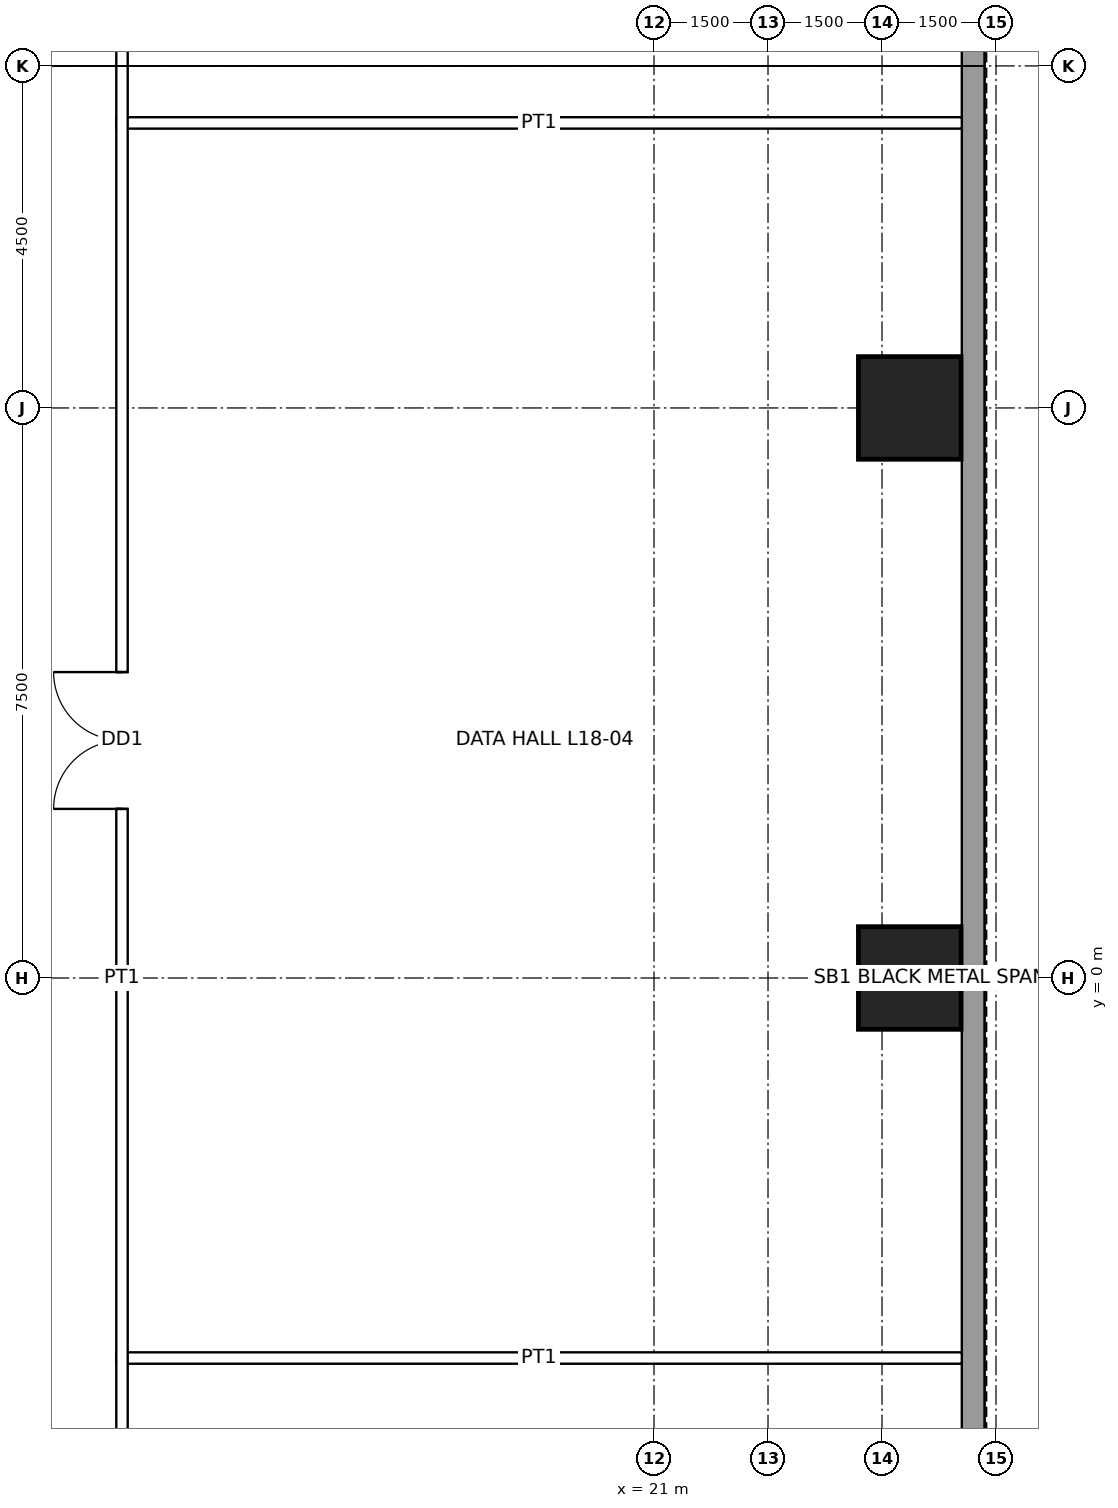
"""IFC4 building model, lengths in metres.
Left out: names, types, materials, properties, quantities, classifications, styles, units other than length and angle.
Written with IfcOpenShell. Run it as: python <this file> out.ifc"""

import sys

from ifc_helpers import new_model, si_unit, direction, frame, frame_2d, origin, origin_2d, place, context, subcontext, project, spatial, rectangle, hollow_rectangle, extrude, element, fill, save


model = new_model("IFC4")
c1 = context("Model", 3, precision=1e-05, world=origin(), true_north=direction((0.0, 1.0)))
c2 = subcontext(c1, "Body", "Model", "MODEL_VIEW")
j1 = project(units=[si_unit("LENGTHUNIT", "METRE"), si_unit("PLANEANGLEUNIT", "RADIAN")], contexts=[c1])
p1 = place(None, origin())
s1 = spatial("IfcSite", under=j1, at=p1, CompositionType="ELEMENT")
p2 = place(p1, origin())
s2 = spatial("IfcBuilding", under=s1, at=p2, CompositionType="ELEMENT")
p3 = place(p2, frame((0.0, 0.0, 93.4)))
s3 = spatial("IfcBuildingStorey", under=s2, at=p3, CompositionType="ELEMENT", Elevation=93.4)
for number, where, z_axis, x_axis in (
    (1, (24.365, 7.5, 0.0), (0.0, 0.0, 1.0), (1.0, 0.0, 0.0)),
    (2, (24.365, 0.0, 0.0), (0.0, 0.0, 1.0), (1.0, 0.0, 0.0)),
):
    element("IfcColumn", number, at=place(p3, frame(where, z_axis=z_axis, x_axis=x_axis)), inside=s3, PredefinedType="COLUMN", context=c2, shape_type="SweptSolid", body=[
        extrude(hollow_rectangle(XDim=1.35, YDim=1.35, WallThickness=0.1, at=origin_2d()), origin(), (0.0, 0.0, 1.0), 5.0),
    ])
p4 = place(p3, frame((25.2, 17.7, 0.0), z_axis=(0.0, 0.0, 1.0), x_axis=(0.0, -1.0, 0.0)))
e3 = element("IfcWall", 3, at=p4, inside=s3, PredefinedType="SOLIDWALL", context=c2, shape_type="SweptSolid", body=[
    extrude(rectangle(XDim=35.4, YDim=0.3, at=frame_2d((17.7, 0.0))), origin(), (0.0, 0.0, 1.0), 4.75),
])
p5 = place(p3, frame((13.925, -5.0, 0.0), z_axis=(0.0, 0.0, 1.0), x_axis=(1.0, 0.0, 0.0)))
e4 = element("IfcWall", 4, at=p5, inside=s3, PredefinedType="PARTITIONING", context=c2, shape_type="SweptSolid", body=[
    extrude(rectangle(XDim=11.125, YDim=0.15, at=frame_2d((5.562, 0.0))), origin(), (0.0, 0.0, 1.0), 4.75),
])
p6 = place(p3, frame((13.925, 11.25, 0.0), z_axis=(0.0, 0.0, 1.0), x_axis=(1.0, 0.0, 0.0)))
e5 = element("IfcWall", 5, at=p6, inside=s3, PredefinedType="PARTITIONING", context=c2, shape_type="SweptSolid", body=[
    extrude(rectangle(XDim=11.125, YDim=0.15, at=frame_2d((5.562, 0.0))), origin(), (0.0, 0.0, 1.0), 3.823),
])
p7 = place(p3, frame((14.0, -14.075, 0.0), z_axis=(0.0, 0.0, 1.0), x_axis=(0.0, 1.0, 0.0)))
e6 = element("IfcWall", 6, at=p7, inside=s3, PredefinedType="PARTITIONING", context=c2, shape_type="SweptSolid", body=[
    extrude(rectangle(XDim=28.15, YDim=0.15, at=frame_2d((14.075, 0.0))), origin(), (0.0, 0.0, 1.0), 4.75),
])
p8 = place(p7, frame((16.3, 0.0, 0.0)))
e7 = element("IfcOpeningElement", 7, at=p8, cuts=e6, PredefinedType="OPENING", context=c2, shape_type="SweptSolid", body=[
    extrude(rectangle(XDim=1.8, YDim=2.4, at=frame_2d((0.9, 1.2))), frame((0.0, 0.085, 0.0), z_axis=(0.0, -1.0, 0.0), x_axis=(1.0, 0.0, 0.0)), (0.0, 0.0, 1.0), 0.17),
])
p9 = place(p7, frame((5.45, 0.0, 0.0)))
e8 = element("IfcOpeningElement", 8, at=p9, cuts=e6, PredefinedType="OPENING", context=c2, shape_type="SweptSolid", body=[
    extrude(rectangle(XDim=1.0, YDim=2.1, at=frame_2d((0.5, 1.05))), frame((0.0, 0.085, 0.0), z_axis=(0.0, -1.0, 0.0), x_axis=(1.0, 0.0, 0.0)), (0.0, 0.0, 1.0), 0.17),
])
p10 = place(p8, origin())
e9 = element("IfcDoor", 9, at=p10, inside=s3, OperationType="DOUBLE_DOOR_SINGLE_SWING", PredefinedType="DOOR", context=c2, shape_type="SweptSolid", body=[
    extrude(rectangle(XDim=1.8, YDim=2.4, at=frame_2d((0.9, 1.2))), frame((0.0, 0.025, 0.0), z_axis=(0.0, -1.0, 0.0), x_axis=(1.0, 0.0, 0.0)), (0.0, 0.0, 1.0), 0.05),
])
fill(e7, e9)
save(model, sys.argv[1])
